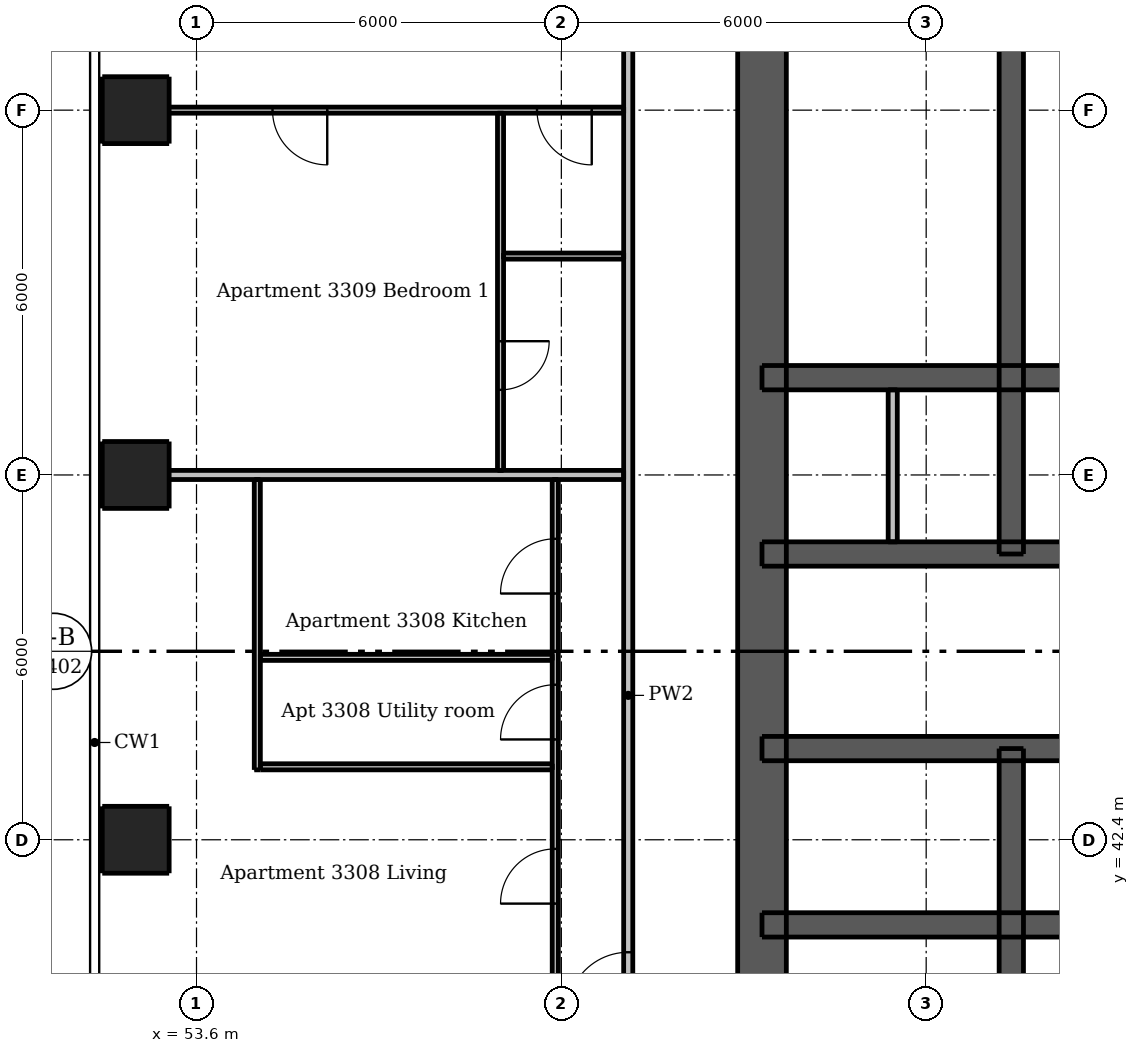
"""IFC4 building model, lengths in metres.
Left out: names, types, materials, properties, quantities, classifications, styles, units other than length and angle.
Written with IfcOpenShell. Run it as: python <this file> out.ifc"""

import sys

from ifc_helpers import new_model, si_unit, direction, frame, frame_2d, origin, origin_2d, place, context, subcontext, project, spatial, rectangle, extrude, element, fill, save


model = new_model("IFC4")
c1 = context("Model", 3, precision=1e-05, world=origin(), true_north=direction((0.0, 1.0)))
c2 = subcontext(c1, "Body", "Model", "MODEL_VIEW")
j1 = project(units=[si_unit("LENGTHUNIT", "METRE"), si_unit("PLANEANGLEUNIT", "RADIAN")], contexts=[c1])
p1 = place(None, origin())
s1 = spatial("IfcSite", under=j1, at=p1, CompositionType="ELEMENT")
p2 = place(p1, origin())
s2 = spatial("IfcBuilding", under=s1, at=p2, CompositionType="ELEMENT")
p3 = place(p2, frame((0.0, 0.0, 121.6)))
s3 = spatial("IfcBuildingStorey", under=s2, at=p3, CompositionType="ELEMENT", Elevation=121.6)
p4 = place(p3, frame((62.9, 33.5, 0.0), z_axis=(0.0, 0.0, 1.0), x_axis=(0.0, 1.0, 0.0)))
e1 = element("IfcWall", 1, at=p4, inside=s3, PredefinedType="SHEAR", context=c2, shape_type="SweptSolid", body=[
    extrude(rectangle(XDim=24.0, YDim=0.8, at=frame_2d((12.0, 0.0))), origin(), (0.0, 0.0, 1.0), 2.95),
])
p5 = place(p4, frame((11.2, 0.0, 0.0)))
e2 = element("IfcOpeningElement", 2, at=p5, cuts=e1, PredefinedType="OPENING", context=c2, shape_type="SweptSolid", body=[
    extrude(rectangle(XDim=1.6, YDim=2.1, at=frame_2d((0.8, 1.05))), frame((0.0, 0.41, 0.0), z_axis=(0.0, -1.0, 0.0), x_axis=(1.0, 0.0, 0.0)), (0.0, 0.0, 1.0), 0.82),
])
p6 = place(p3, frame((62.9, 41.0, 0.0), z_axis=(0.0, 0.0, 1.0), x_axis=(1.0, 0.0, 0.0)))
e3 = element("IfcWall", 3, at=p6, inside=s3, PredefinedType="SHEAR", context=c2, shape_type="SweptSolid", body=[
    extrude(rectangle(XDim=23.2, YDim=0.4, at=frame_2d((11.6, 0.0))), origin(), (0.0, 0.0, 1.0), 2.95),
])
p7 = place(p3, frame((62.9, 43.9, 0.0), z_axis=(0.0, 0.0, 1.0), x_axis=(1.0, 0.0, 0.0)))
e4 = element("IfcWall", 4, at=p7, inside=s3, PredefinedType="SHEAR", context=c2, shape_type="SweptSolid", body=[
    extrude(rectangle(XDim=23.2, YDim=0.4, at=frame_2d((11.6, 0.0))), origin(), (0.0, 0.0, 1.0), 2.95),
])
p8 = place(p7, frame((1.7, 0.0, 0.0)))
e5 = element("IfcOpeningElement", 5, at=p8, cuts=e4, PredefinedType="OPENING", context=c2, shape_type="SweptSolid", body=[
    extrude(rectangle(XDim=0.9, YDim=2.1, at=frame_2d((0.45, 1.05))), frame((0.0, 0.21, 0.0), z_axis=(0.0, -1.0, 0.0), x_axis=(1.0, 0.0, 0.0)), (0.0, 0.0, 1.0), 0.42),
])
p9 = place(p7, frame((20.6, 0.0, 0.0)))
e6 = element("IfcOpeningElement", 6, at=p9, cuts=e4, PredefinedType="OPENING", context=c2, shape_type="SweptSolid", body=[
    extrude(rectangle(XDim=0.9, YDim=2.1, at=frame_2d((0.45, 1.05))), frame((0.0, 0.21, 0.0), z_axis=(0.0, -1.0, 0.0), x_axis=(1.0, 0.0, 0.0)), (0.0, 0.0, 1.0), 0.42),
])
p10 = place(p7, frame((4.8, 0.0, 0.0)))
e7 = element("IfcOpeningElement", 7, at=p10, cuts=e4, PredefinedType="OPENING", context=c2, shape_type="SweptSolid", body=[
    extrude(rectangle(XDim=1.1, YDim=2.1, at=frame_2d((0.55, 1.05))), frame((0.0, 0.21, 0.0), z_axis=(0.0, -1.0, 0.0), x_axis=(1.0, 0.0, 0.0)), (0.0, 0.0, 1.0), 0.42),
])
p11 = place(p7, frame((7.3, 0.0, 0.0)))
e8 = element("IfcOpeningElement", 8, at=p11, cuts=e4, PredefinedType="OPENING", context=c2, shape_type="SweptSolid", body=[
    extrude(rectangle(XDim=1.1, YDim=2.1, at=frame_2d((0.55, 1.05))), frame((0.0, 0.21, 0.0), z_axis=(0.0, -1.0, 0.0), x_axis=(1.0, 0.0, 0.0)), (0.0, 0.0, 1.0), 0.42),
])
p12 = place(p7, frame((9.8, 0.0, 0.0)))
e9 = element("IfcOpeningElement", 9, at=p12, cuts=e4, PredefinedType="OPENING", context=c2, shape_type="SweptSolid", body=[
    extrude(rectangle(XDim=1.1, YDim=2.1, at=frame_2d((0.55, 1.05))), frame((0.0, 0.21, 0.0), z_axis=(0.0, -1.0, 0.0), x_axis=(1.0, 0.0, 0.0)), (0.0, 0.0, 1.0), 0.42),
])
p13 = place(p7, frame((12.3, 0.0, 0.0)))
e10 = element("IfcOpeningElement", 10, at=p13, cuts=e4, PredefinedType="OPENING", context=c2, shape_type="SweptSolid", body=[
    extrude(rectangle(XDim=1.1, YDim=2.1, at=frame_2d((0.55, 1.05))), frame((0.0, 0.21, 0.0), z_axis=(0.0, -1.0, 0.0), x_axis=(1.0, 0.0, 0.0)), (0.0, 0.0, 1.0), 0.42),
])
p14 = place(p7, frame((14.8, 0.0, 0.0)))
e11 = element("IfcOpeningElement", 11, at=p14, cuts=e4, PredefinedType="OPENING", context=c2, shape_type="SweptSolid", body=[
    extrude(rectangle(XDim=1.1, YDim=2.1, at=frame_2d((0.55, 1.05))), frame((0.0, 0.21, 0.0), z_axis=(0.0, -1.0, 0.0), x_axis=(1.0, 0.0, 0.0)), (0.0, 0.0, 1.0), 0.42),
])
p15 = place(p7, frame((17.3, 0.0, 0.0)))
e12 = element("IfcOpeningElement", 12, at=p15, cuts=e4, PredefinedType="OPENING", context=c2, shape_type="SweptSolid", body=[
    extrude(rectangle(XDim=1.1, YDim=2.1, at=frame_2d((0.55, 1.05))), frame((0.0, 0.21, 0.0), z_axis=(0.0, -1.0, 0.0), x_axis=(1.0, 0.0, 0.0)), (0.0, 0.0, 1.0), 0.42),
])
p16 = place(p3, frame((62.9, 47.1, 0.0), z_axis=(0.0, 0.0, 1.0), x_axis=(1.0, 0.0, 0.0)))
e13 = element("IfcWall", 13, at=p16, inside=s3, PredefinedType="SHEAR", context=c2, shape_type="SweptSolid", body=[
    extrude(rectangle(XDim=23.2, YDim=0.4, at=frame_2d((11.6, 0.0))), origin(), (0.0, 0.0, 1.0), 2.95),
])
p17 = place(p16, frame((0.825, 0.0, 0.0)))
e14 = element("IfcOpeningElement", 14, at=p17, cuts=e13, PredefinedType="OPENING", context=c2, shape_type="SweptSolid", body=[
    extrude(rectangle(XDim=0.9, YDim=2.1, at=frame_2d((0.45, 1.05))), frame((0.0, 0.21, 0.0), z_axis=(0.0, -1.0, 0.0), x_axis=(1.0, 0.0, 0.0)), (0.0, 0.0, 1.0), 0.42),
])
p18 = place(p16, frame((2.575, 0.0, 0.0)))
e15 = element("IfcOpeningElement", 15, at=p18, cuts=e13, PredefinedType="OPENING", context=c2, shape_type="SweptSolid", body=[
    extrude(rectangle(XDim=0.9, YDim=2.1, at=frame_2d((0.45, 1.05))), frame((0.0, 0.21, 0.0), z_axis=(0.0, -1.0, 0.0), x_axis=(1.0, 0.0, 0.0)), (0.0, 0.0, 1.0), 0.42),
])
p19 = place(p16, frame((20.6, 0.0, 0.0)))
e16 = element("IfcOpeningElement", 16, at=p19, cuts=e13, PredefinedType="OPENING", context=c2, shape_type="SweptSolid", body=[
    extrude(rectangle(XDim=0.9, YDim=2.1, at=frame_2d((0.45, 1.05))), frame((0.0, 0.21, 0.0), z_axis=(0.0, -1.0, 0.0), x_axis=(1.0, 0.0, 0.0)), (0.0, 0.0, 1.0), 0.42),
])
p20 = place(p3, frame((62.9, 50.0, 0.0), z_axis=(0.0, 0.0, 1.0), x_axis=(1.0, 0.0, 0.0)))
e17 = element("IfcWall", 17, at=p20, inside=s3, PredefinedType="SHEAR", context=c2, shape_type="SweptSolid", body=[
    extrude(rectangle(XDim=23.2, YDim=0.4, at=frame_2d((11.6, 0.0))), origin(), (0.0, 0.0, 1.0), 2.95),
])
p21 = place(p3, frame((67.0, 33.9, 0.0), z_axis=(0.0, 0.0, 1.0), x_axis=(0.0, 1.0, 0.0)))
e18 = element("IfcWall", 18, at=p21, inside=s3, PredefinedType="SHEAR", context=c2, shape_type="SweptSolid", body=[
    extrude(rectangle(XDim=10.0, YDim=0.4, at=frame_2d((5.0, 0.0))), origin(), (0.0, 0.0, 1.0), 2.95),
])
p22 = place(p21, frame((0.6, 0.0, 0.0)))
e19 = element("IfcOpeningElement", 19, at=p22, cuts=e18, PredefinedType="OPENING", context=c2, shape_type="SweptSolid", body=[
    extrude(rectangle(XDim=1.1, YDim=2.1, at=frame_2d((0.55, 1.05))), frame((0.0, 0.21, 0.0), z_axis=(0.0, -1.0, 0.0), x_axis=(1.0, 0.0, 0.0)), (0.0, 0.0, 1.0), 0.42),
])
p23 = place(p3, frame((67.0, 47.1, 0.0), z_axis=(0.0, 0.0, 1.0), x_axis=(0.0, 1.0, 0.0)))
e20 = element("IfcWall", 20, at=p23, inside=s3, PredefinedType="SHEAR", context=c2, shape_type="SweptSolid", body=[
    extrude(rectangle(XDim=10.0, YDim=0.4, at=frame_2d((5.0, 0.0))), origin(), (0.0, 0.0, 1.0), 2.95),
])
for number, where, z_axis, x_axis in (
    (21, (52.6, 42.4, 0.0), (0.0, 0.0, 1.0), (1.0, 0.0, 0.0)),
    (22, (52.6, 48.4, 0.0), (0.0, 0.0, 1.0), (1.0, 0.0, 0.0)),
    (23, (52.6, 54.4, 0.0), (0.0, 0.0, 1.0), (1.0, 0.0, 0.0)),
):
    element("IfcColumn", number, at=place(p3, frame(where, z_axis=z_axis, x_axis=x_axis)), inside=s3, PredefinedType="COLUMN", context=c2, shape_type="SweptSolid", body=[
        extrude(rectangle(XDim=1.1, YDim=1.1, at=origin_2d()), origin(), (0.0, 0.0, 1.0), 2.95),
    ])
p24 = place(p3, frame((65.05, 47.3, 0.0), z_axis=(0.0, 0.0, 1.0), x_axis=(0.0, 1.0, 0.0)))
e24 = element("IfcWall", 24, at=p24, inside=s3, PredefinedType="PLUMBINGWALL", context=c2, shape_type="SweptSolid", body=[
    extrude(rectangle(XDim=2.5, YDim=0.15, at=frame_2d((1.25, 0.0))), origin(), (0.0, 0.0, 1.0), 2.95),
])
p25 = place(p3, frame((54.6, 43.55, 0.0), z_axis=(0.0, 0.0, 1.0), x_axis=(0.0, 1.0, 0.0)))
e25 = element("IfcWall", 25, at=p25, inside=s3, PredefinedType="PARTITIONING", context=c2, shape_type="SweptSolid", body=[
    extrude(rectangle(XDim=4.775, YDim=0.1, at=frame_2d((2.387, 0.0))), origin(), (0.0, 0.0, 1.0), 2.95),
])
p26 = place(p3, frame((58.6, 54.35, 0.0), z_axis=(0.0, 0.0, 1.0), x_axis=(0.0, -1.0, 0.0)))
e26 = element("IfcWall", 26, at=p26, inside=s3, PredefinedType="PARTITIONING", context=c2, shape_type="SweptSolid", body=[
    extrude(rectangle(XDim=5.875, YDim=0.1, at=frame_2d((2.938, 0.0))), origin(), (0.0, 0.0, 1.0), 2.95),
])
p27 = place(p26, frame((3.75, 0.0, 0.0)))
e27 = element("IfcOpeningElement", 27, at=p27, cuts=e26, PredefinedType="OPENING", context=c2, shape_type="SweptSolid", body=[
    extrude(rectangle(XDim=0.8, YDim=2.1, at=frame_2d((0.4, 1.05))), frame((0.0, 0.06, 0.0), z_axis=(0.0, -1.0, 0.0), x_axis=(1.0, 0.0, 0.0)), (0.0, 0.0, 1.0), 0.12),
])
p28 = place(p3, frame((59.5, 31.65, 0.0), z_axis=(0.0, 0.0, 1.0), x_axis=(0.0, 1.0, 0.0)))
e28 = element("IfcWall", 28, at=p28, inside=s3, PredefinedType="PARTITIONING", context=c2, shape_type="SweptSolid", body=[
    extrude(rectangle(XDim=16.675, YDim=0.1, at=frame_2d((8.337, 0.0))), origin(), (0.0, 0.0, 1.0), 2.332),
])
p29 = place(p28, frame((9.7, 0.0, 0.0)))
e29 = element("IfcOpeningElement", 29, at=p29, cuts=e28, PredefinedType="OPENING", context=c2, shape_type="SweptSolid", body=[
    extrude(rectangle(XDim=0.9, YDim=2.1, at=frame_2d((0.45, 1.05))), frame((0.0, 0.06, 0.0), z_axis=(0.0, -1.0, 0.0), x_axis=(1.0, 0.0, 0.0)), (0.0, 0.0, 1.0), 0.12),
])
p30 = place(p28, frame((14.8, 0.0, 0.0)))
e30 = element("IfcOpeningElement", 30, at=p30, cuts=e28, PredefinedType="OPENING", context=c2, shape_type="SweptSolid", body=[
    extrude(rectangle(XDim=0.9, YDim=2.1, at=frame_2d((0.45, 1.05))), frame((0.0, 0.06, 0.0), z_axis=(0.0, -1.0, 0.0), x_axis=(1.0, 0.0, 0.0)), (0.0, 0.0, 1.0), 0.12),
])
p31 = place(p28, frame((12.4, 0.0, 0.0)))
e31 = element("IfcOpeningElement", 31, at=p31, cuts=e28, PredefinedType="OPENING", context=c2, shape_type="SweptSolid", body=[
    extrude(rectangle(XDim=0.9, YDim=2.1, at=frame_2d((0.45, 1.05))), frame((0.0, 0.06, 0.0), z_axis=(0.0, -1.0, 0.0), x_axis=(1.0, 0.0, 0.0)), (0.0, 0.0, 1.0), 0.12),
])
p32 = place(p28, frame((5.2, 0.0, 0.0)))
e32 = element("IfcOpeningElement", 32, at=p32, cuts=e28, PredefinedType="OPENING", context=c2, shape_type="SweptSolid", body=[
    extrude(rectangle(XDim=0.9, YDim=2.1, at=frame_2d((0.45, 1.05))), frame((0.0, 0.06, 0.0), z_axis=(0.0, -1.0, 0.0), x_axis=(1.0, 0.0, 0.0)), (0.0, 0.0, 1.0), 0.12),
])
p33 = place(p28, frame((7.05, 0.0, 0.0)))
e33 = element("IfcOpeningElement", 33, at=p33, cuts=e28, PredefinedType="OPENING", context=c2, shape_type="SweptSolid", body=[
    extrude(rectangle(XDim=0.8, YDim=2.1, at=frame_2d((0.4, 1.05))), frame((0.0, 0.06, 0.0), z_axis=(0.0, -1.0, 0.0), x_axis=(1.0, 0.0, 0.0)), (0.0, 0.0, 1.0), 0.12),
])
p34 = place(p28, frame((0.75, 0.0, 0.0)))
e34 = element("IfcOpeningElement", 34, at=p34, cuts=e28, PredefinedType="OPENING", context=c2, shape_type="SweptSolid", body=[
    extrude(rectangle(XDim=0.9, YDim=2.1, at=frame_2d((0.45, 1.05))), frame((0.0, 0.06, 0.0), z_axis=(0.0, -1.0, 0.0), x_axis=(1.0, 0.0, 0.0)), (0.0, 0.0, 1.0), 0.12),
])
p35 = place(p28, frame((3.15, 0.0, 0.0)))
e35 = element("IfcOpeningElement", 35, at=p35, cuts=e28, PredefinedType="OPENING", context=c2, shape_type="SweptSolid", body=[
    extrude(rectangle(XDim=0.8, YDim=2.1, at=frame_2d((0.4, 1.05))), frame((0.0, 0.06, 0.0), z_axis=(0.0, -1.0, 0.0), x_axis=(1.0, 0.0, 0.0)), (0.0, 0.0, 1.0), 0.12),
])
p36 = place(p3, frame((60.625, 54.4, 0.0), z_axis=(0.0, 0.0, 1.0), x_axis=(-1.0, 0.0, 0.0)))
e36 = element("IfcWall", 36, at=p36, inside=s3, PredefinedType="PARTITIONING", context=c2, shape_type="SweptSolid", body=[
    extrude(rectangle(XDim=8.625, YDim=0.1, at=frame_2d((4.312, 0.0))), origin(), (0.0, 0.0, 1.0), 2.332),
])
p37 = place(p36, frame((0.525, 0.0, 0.0)))
e37 = element("IfcOpeningElement", 37, at=p37, cuts=e36, PredefinedType="OPENING", context=c2, shape_type="SweptSolid", body=[
    extrude(rectangle(XDim=0.9, YDim=2.1, at=frame_2d((0.45, 1.05))), frame((0.0, 0.06, 0.0), z_axis=(0.0, -1.0, 0.0), x_axis=(1.0, 0.0, 0.0)), (0.0, 0.0, 1.0), 0.12),
])
p38 = place(p36, frame((4.875, 0.0, 0.0)))
e38 = element("IfcOpeningElement", 38, at=p38, cuts=e36, PredefinedType="OPENING", context=c2, shape_type="SweptSolid", body=[
    extrude(rectangle(XDim=0.9, YDim=2.1, at=frame_2d((0.45, 1.05))), frame((0.0, 0.06, 0.0), z_axis=(0.0, -1.0, 0.0), x_axis=(1.0, 0.0, 0.0)), (0.0, 0.0, 1.0), 0.12),
])
p39 = place(p3, frame((58.65, 52.0, 0.0), z_axis=(0.0, 0.0, 1.0), x_axis=(1.0, 0.0, 0.0)))
e39 = element("IfcWall", 39, at=p39, inside=s3, PredefinedType="PARTITIONING", context=c2, shape_type="SweptSolid", body=[
    extrude(rectangle(XDim=1.975, YDim=0.1, at=frame_2d((0.988, 0.0))), origin(), (0.0, 0.0, 1.0), 2.95),
])
for number, where, z_axis, x_axis in (
    (40, (54.65, 45.4, 0.0), (0.0, 0.0, 1.0), (1.0, 0.0, 0.0)),
    (41, (54.65, 43.6, 0.0), (0.0, 0.0, 1.0), (1.0, 0.0, 0.0)),
):
    element("IfcWall", number, at=place(p3, frame(where, z_axis=z_axis, x_axis=x_axis)), inside=s3, PredefinedType="PARTITIONING", context=c2, shape_type="SweptSolid", body=[
        extrude(rectangle(XDim=4.8, YDim=0.1, at=frame_2d((2.4, 0.0))), origin(), (0.0, 0.0, 1.0), 2.95),
    ])
p40 = place(p3, frame((60.7, 30.325, 0.0), z_axis=(0.0, 0.0, 1.0), x_axis=(0.0, 1.0, 0.0)))
e42 = element("IfcWall", 42, at=p40, inside=s3, PredefinedType="PARTITIONING", context=c2, shape_type="SweptSolid", body=[
    extrude(rectangle(XDim=28.9, YDim=0.15, at=frame_2d((14.45, 0.0))), origin(), (0.0, 0.0, 1.0), 2.95),
])
p41 = place(p40, frame((9.225, 0.0, 0.0)))
e43 = element("IfcOpeningElement", 43, at=p41, cuts=e42, PredefinedType="OPENING", context=c2, shape_type="SweptSolid", body=[
    extrude(rectangle(XDim=1.0, YDim=2.1, at=frame_2d((0.5, 1.05))), frame((0.0, 0.085, 0.0), z_axis=(0.0, -1.0, 0.0), x_axis=(1.0, 0.0, 0.0)), (0.0, 0.0, 1.0), 0.17),
])
p42 = place(p40, frame((26.025, 0.0, 0.0)))
e44 = element("IfcOpeningElement", 44, at=p42, cuts=e42, PredefinedType="OPENING", context=c2, shape_type="SweptSolid", body=[
    extrude(rectangle(XDim=1.0, YDim=2.1, at=frame_2d((0.5, 1.05))), frame((0.0, 0.085, 0.0), z_axis=(0.0, -1.0, 0.0), x_axis=(1.0, 0.0, 0.0)), (0.0, 0.0, 1.0), 0.17),
])
p43 = place(p3, frame((52.0, 48.4, 0.0), z_axis=(0.0, 0.0, 1.0), x_axis=(1.0, 0.0, 0.0)))
e45 = element("IfcWall", 45, at=p43, inside=s3, PredefinedType="PARTITIONING", context=c2, shape_type="SweptSolid", body=[
    extrude(rectangle(XDim=8.625, YDim=0.15, at=frame_2d((4.312, 0.0))), origin(), (0.0, 0.0, 1.0), 2.332),
])
p44 = place(p5, origin())
e46 = element("IfcDoor", 46, at=p44, inside=s3, OperationType="DOUBLE_DOOR_SINGLE_SWING", PredefinedType="DOOR", context=c2, shape_type="SweptSolid", body=[
    extrude(rectangle(XDim=1.6, YDim=2.1, at=frame_2d((0.8, 1.05))), frame((0.0, -0.337, 0.0), z_axis=(0.0, -1.0, 0.0), x_axis=(1.0, 0.0, 0.0)), (0.0, 0.0, 1.0), 0.05),
])
fill(e2, e46)
p45 = place(p8, origin())
e47 = element("IfcDoor", 47, at=p45, inside=s3, OperationType="SINGLE_SWING_LEFT", PredefinedType="DOOR", context=c2, shape_type="SweptSolid", body=[
    extrude(rectangle(XDim=0.9, YDim=2.1, at=frame_2d((0.45, 1.05))), frame((0.0, -0.138, 0.0), z_axis=(0.0, -1.0, 0.0), x_axis=(1.0, 0.0, 0.0)), (0.0, 0.0, 1.0), 0.05),
])
fill(e5, e47)
p46 = place(p17, origin())
e48 = element("IfcDoor", 48, at=p46, inside=s3, OperationType="SINGLE_SWING_LEFT", PredefinedType="DOOR", context=c2, shape_type="SweptSolid", body=[
    extrude(rectangle(XDim=0.9, YDim=2.1, at=frame_2d((0.45, 1.05))), frame((0.0, 0.188, 0.0), z_axis=(0.0, -1.0, 0.0), x_axis=(1.0, 0.0, 0.0)), (0.0, 0.0, 1.0), 0.05),
])
fill(e14, e48)
p47 = place(p18, origin())
e49 = element("IfcDoor", 49, at=p47, inside=s3, OperationType="SINGLE_SWING_RIGHT", PredefinedType="DOOR", context=c2, shape_type="SweptSolid", body=[
    extrude(rectangle(XDim=0.9, YDim=2.1, at=frame_2d((0.45, 1.05))), frame((0.0, 0.188, 0.0), z_axis=(0.0, -1.0, 0.0), x_axis=(1.0, 0.0, 0.0)), (0.0, 0.0, 1.0), 0.05),
])
fill(e15, e49)
p48 = place(p10, origin())
e50 = element("IfcDoor", 50, at=p48, inside=s3, OperationType="DOUBLE_DOOR_SLIDING", PredefinedType="DOOR", context=c2, shape_type="SweptSolid", body=[
    extrude(rectangle(XDim=1.1, YDim=2.1, at=frame_2d((0.55, 1.05))), frame((0.0, 0.025, 0.0), z_axis=(0.0, -1.0, 0.0), x_axis=(1.0, 0.0, 0.0)), (0.0, 0.0, 1.0), 0.05),
])
fill(e7, e50)
p49 = place(p41, origin())
e51 = element("IfcDoor", 51, at=p49, inside=s3, OperationType="SINGLE_SWING_LEFT", PredefinedType="DOOR", context=c2, shape_type="SweptSolid", body=[
    extrude(rectangle(XDim=1.0, YDim=2.1, at=frame_2d((0.5, 1.05))), frame((0.0, 0.025, 0.0), z_axis=(0.0, -1.0, 0.0), x_axis=(1.0, 0.0, 0.0)), (0.0, 0.0, 1.0), 0.05),
])
fill(e43, e51)
p50 = place(p29, origin())
e52 = element("IfcDoor", 52, at=p50, inside=s3, OperationType="SINGLE_SWING_LEFT", PredefinedType="DOOR", context=c2, shape_type="SweptSolid", body=[
    extrude(rectangle(XDim=0.9, YDim=2.1, at=frame_2d((0.45, 1.05))), frame((0.0, 0.025, 0.0), z_axis=(0.0, -1.0, 0.0), x_axis=(1.0, 0.0, 0.0)), (0.0, 0.0, 1.0), 0.05),
])
fill(e29, e52)
p51 = place(p30, origin())
e53 = element("IfcDoor", 53, at=p51, inside=s3, OperationType="SINGLE_SWING_LEFT", PredefinedType="DOOR", context=c2, shape_type="SweptSolid", body=[
    extrude(rectangle(XDim=0.9, YDim=2.1, at=frame_2d((0.45, 1.05))), frame((0.0, 0.025, 0.0), z_axis=(0.0, -1.0, 0.0), x_axis=(1.0, 0.0, 0.0)), (0.0, 0.0, 1.0), 0.05),
])
fill(e30, e53)
p52 = place(p31, origin())
e54 = element("IfcDoor", 54, at=p52, inside=s3, OperationType="SINGLE_SWING_LEFT", PredefinedType="DOOR", context=c2, shape_type="SweptSolid", body=[
    extrude(rectangle(XDim=0.9, YDim=2.1, at=frame_2d((0.45, 1.05))), frame((0.0, 0.025, 0.0), z_axis=(0.0, -1.0, 0.0), x_axis=(1.0, 0.0, 0.0)), (0.0, 0.0, 1.0), 0.05),
])
fill(e31, e54)
p53 = place(p37, origin())
e55 = element("IfcDoor", 55, at=p53, inside=s3, OperationType="SINGLE_SWING_LEFT", PredefinedType="DOOR", context=c2, shape_type="SweptSolid", body=[
    extrude(rectangle(XDim=0.9, YDim=2.1, at=frame_2d((0.45, 1.05))), frame((0.0, 0.025, 0.0), z_axis=(0.0, -1.0, 0.0), x_axis=(1.0, 0.0, 0.0)), (0.0, 0.0, 1.0), 0.05),
])
fill(e37, e55)
p54 = place(p38, origin())
e56 = element("IfcDoor", 56, at=p54, inside=s3, OperationType="SINGLE_SWING_LEFT", PredefinedType="DOOR", context=c2, shape_type="SweptSolid", body=[
    extrude(rectangle(XDim=0.9, YDim=2.1, at=frame_2d((0.45, 1.05))), frame((0.0, 0.025, 0.0), z_axis=(0.0, -1.0, 0.0), x_axis=(1.0, 0.0, 0.0)), (0.0, 0.0, 1.0), 0.05),
])
fill(e38, e56)
p55 = place(p27, origin())
e57 = element("IfcDoor", 57, at=p55, inside=s3, OperationType="SINGLE_SWING_LEFT", PredefinedType="DOOR", context=c2, shape_type="SweptSolid", body=[
    extrude(rectangle(XDim=0.8, YDim=2.1, at=frame_2d((0.4, 1.05))), frame((0.0, 0.025, 0.0), z_axis=(0.0, -1.0, 0.0), x_axis=(1.0, 0.0, 0.0)), (0.0, 0.0, 1.0), 0.05),
])
fill(e27, e57)
save(model, sys.argv[1])
